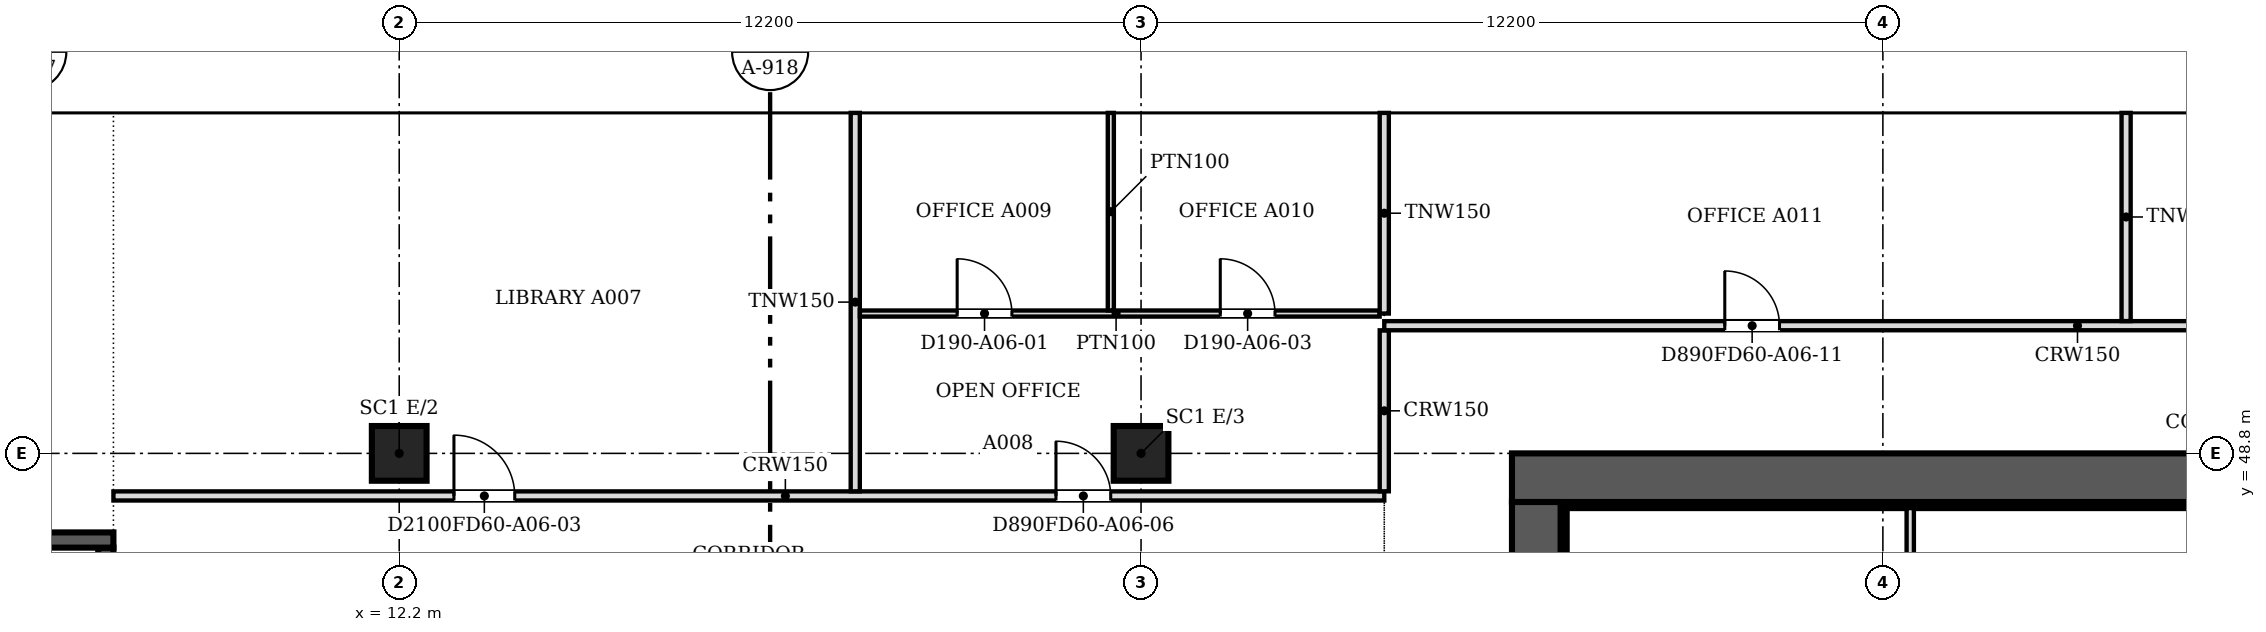
"""IFC4 building model, lengths in metres.
Left out: names, types, materials, properties, quantities, classifications, styles, units other than length and angle.
Written with IfcOpenShell. Run it as: python <this file> out.ifc"""

import sys

from ifc_helpers import new_model, si_unit, direction, frame, frame_2d, origin, origin_2d, place, context, subcontext, project, spatial, polyline, rectangle, outline, extrude, faceted_brep, source, transform, mapped, element, fill, save


model = new_model("IFC4")
c1 = context("Model", 3, precision=1e-05, world=origin(), true_north=direction((0.0, 1.0)))
c2 = subcontext(c1, "Body", "Model", "MODEL_VIEW")
j1 = project(units=[si_unit("LENGTHUNIT", "METRE"), si_unit("PLANEANGLEUNIT", "RADIAN")], contexts=[c1])
p1 = place(None, origin())
s1 = spatial("IfcSite", under=j1, at=p1, CompositionType="ELEMENT")
p2 = place(p1, origin())
s2 = spatial("IfcBuilding", under=s1, at=p2, CompositionType="ELEMENT")
p3 = place(p2, frame((0.0, 0.0, 68.6)))
s3 = spatial("IfcBuildingStorey", under=s2, at=p3, CompositionType="ELEMENT", Elevation=68.6)
for number, where, z_axis, x_axis in (
    (1, (12.2, 48.8, 0.0), (0.0, 0.0, 1.0), (1.0, 0.0, 0.0)),
    (2, (24.4, 48.8, 0.0), (0.0, 0.0, 1.0), (1.0, 0.0, 0.0)),
):
    element("IfcColumn", number, at=place(p3, frame(where, z_axis=z_axis, x_axis=x_axis)), inside=s3, PredefinedType="COLUMN", context=c2, shape_type="SweptSolid", body=[
        extrude(rectangle(XDim=0.9, YDim=0.9, at=origin_2d()), origin(), (0.0, 0.0, 1.0), 3.6),
    ])
m1 = source(origin(), c2, "Body", "SweptSolid", [
    extrude(outline(polyline([(6.1, 0.0), (3.05, 3.8), (0.0, 0.0), (6.1, 0.0)])), frame((0.0, 0.25, 0.0), z_axis=(0.0, -1.0, 0.0), x_axis=(1.0, 0.0, 0.0)), (0.0, 0.0, 1.0), 0.5),
])
p4 = place(p3, frame((45.75, 54.65, 0.0), z_axis=(0.0, 0.0, 1.0), x_axis=(-1.0, 0.0, 0.0)))
e3 = element("IfcWall", 3, at=p4, inside=s3, PredefinedType="SOLIDWALL", context=c2, shape_type="MappedRepresentation", body=[
    mapped(m1, transform((0.0, 0.0, 0.0), scale=1.0)),
])
m2 = source(origin(), c2, "Body", "SweptSolid", [
    extrude(outline(polyline([(5.579, 0.25), (3.05, 3.4), (0.521, 0.25), (5.579, 0.25)])), frame((0.0, 0.26, 0.0), z_axis=(0.0, -1.0, 0.0), x_axis=(1.0, 0.0, 0.0)), (0.0, 0.0, 1.0), 0.52),
])
p5 = place(p4, origin())
e4 = element("IfcOpeningElement", 4, at=p5, cuts=e3, PredefinedType="OPENING", context=c2, shape_type="MappedRepresentation", body=[
    mapped(m2, transform((0.0, 0.0, 0.0), scale=1.0)),
])
m3 = source(origin(), c2, "Body", "Brep", [
    faceted_brep([(6.1, -0.25, 0.0), (3.05, -0.25, 3.8), (0.0, -0.25, 0.0), (6.1, -0.25, 0.0), (0.0, 0.25, 0.0), (3.05, 0.25, 3.8), (6.1, 0.25, 0.0), (6.1, 0.25, 0.0)], [[[0, 1, 2, 3]], [[4, 5, 6, 7]], [[6, 5, 1, 0]], [[5, 4, 2, 1]], [[4, 7, 3, 2]], [[3, 7, 6, 0]]]),
])
p6 = place(p3, frame((39.65, 54.65, 0.0), z_axis=(0.0, 0.0, 1.0), x_axis=(-1.0, 0.0, 0.0)))
e5 = element("IfcWall", 5, at=p6, inside=s3, PredefinedType="SOLIDWALL", context=c2, shape_type="MappedRepresentation", body=[
    mapped(m3, transform((0.0, 0.0, 0.0), scale=1.0)),
])
p7 = place(p6, origin())
e6 = element("IfcOpeningElement", 6, at=p7, cuts=e5, PredefinedType="OPENING", context=c2, shape_type="MappedRepresentation", body=[
    mapped(m2, transform((0.0, 0.0, 0.0), scale=1.0)),
])
p8 = place(p3, frame((33.55, 54.65, 0.0), z_axis=(0.0, 0.0, 1.0), x_axis=(-1.0, 0.0, 0.0)))
e7 = element("IfcWall", 7, at=p8, inside=s3, PredefinedType="SOLIDWALL", context=c2, shape_type="MappedRepresentation", body=[
    mapped(m1, transform((0.0, 0.0, 0.0), scale=1.0)),
])
p9 = place(p8, origin())
e8 = element("IfcOpeningElement", 8, at=p9, cuts=e7, PredefinedType="OPENING", context=c2, shape_type="MappedRepresentation", body=[
    mapped(m2, transform((0.0, 0.0, 0.0), scale=1.0)),
])
p10 = place(p3, frame((27.45, 54.65, 0.0), z_axis=(0.0, 0.0, 1.0), x_axis=(-1.0, 0.0, 0.0)))
e9 = element("IfcWall", 9, at=p10, inside=s3, PredefinedType="SOLIDWALL", context=c2, shape_type="MappedRepresentation", body=[
    mapped(m3, transform((0.0, 0.0, 0.0), scale=1.0)),
])
p11 = place(p10, origin())
e10 = element("IfcOpeningElement", 10, at=p11, cuts=e9, PredefinedType="OPENING", context=c2, shape_type="MappedRepresentation", body=[
    mapped(m2, transform((0.0, 0.0, 0.0), scale=1.0)),
])
p12 = place(p3, frame((21.35, 54.65, 0.0), z_axis=(0.0, 0.0, 1.0), x_axis=(-1.0, 0.0, 0.0)))
e11 = element("IfcWall", 11, at=p12, inside=s3, PredefinedType="SOLIDWALL", context=c2, shape_type="MappedRepresentation", body=[
    mapped(m1, transform((0.0, 0.0, 0.0), scale=1.0)),
])
p13 = place(p12, origin())
e12 = element("IfcOpeningElement", 12, at=p13, cuts=e11, PredefinedType="OPENING", context=c2, shape_type="MappedRepresentation", body=[
    mapped(m2, transform((0.0, 0.0, 0.0), scale=1.0)),
])
p14 = place(p3, frame((15.25, 54.65, 0.0), z_axis=(0.0, 0.0, 1.0), x_axis=(-1.0, 0.0, 0.0)))
e13 = element("IfcWall", 13, at=p14, inside=s3, PredefinedType="SOLIDWALL", context=c2, shape_type="MappedRepresentation", body=[
    mapped(m1, transform((0.0, 0.0, 0.0), scale=1.0)),
])
p15 = place(p14, origin())
e14 = element("IfcOpeningElement", 14, at=p15, cuts=e13, PredefinedType="OPENING", context=c2, shape_type="MappedRepresentation", body=[
    mapped(m2, transform((0.0, 0.0, 0.0), scale=1.0)),
])
m4 = source(origin(), c2, "Body", "Brep", [
    faceted_brep([(3.05, -0.25, 3.74), (3.003, -0.25, 3.8), (0.0, -0.25, 0.0), (3.05, -0.25, 0.0), (0.0, 0.25, 0.0), (2.957, 0.25, 3.741), (2.957, 0.25, 0.0), (3.003, 0.0, 3.8)], [[[0, 1, 2, 3]], [[4, 5, 6]], [[7, 1, 0]], [[5, 4, 2, 1, 7]], [[4, 6, 3, 2]], [[3, 6, 5, 7, 0]]]),
])
p16 = place(p3, frame((9.15, 54.65, 0.0), z_axis=(0.0, 0.0, 1.0), x_axis=(-1.0, 0.0, 0.0)))
e15 = element("IfcWall", 15, at=p16, inside=s3, PredefinedType="SOLIDWALL", context=c2, shape_type="MappedRepresentation", body=[
    mapped(m4, transform((0.0, 0.0, 0.0), scale=1.0)),
])
m5 = source(origin(), c2, "Body", "SweptSolid", [
    extrude(outline(polyline([(2.803, 3.144), (0.516, 0.25), (2.803, 0.25), (2.803, 3.144)])), frame((0.0, 0.26, 0.0), z_axis=(0.0, -1.0, 0.0), x_axis=(1.0, 0.0, 0.0)), (0.0, 0.0, 1.0), 0.52),
])
p17 = place(p16, origin())
e16 = element("IfcOpeningElement", 16, at=p17, cuts=e15, PredefinedType="OPENING", context=c2, shape_type="MappedRepresentation", body=[
    mapped(m5, transform((0.0, 0.0, 0.0), scale=1.0)),
])
p18 = place(p2, frame((0.0, 0.0, 72.4)))
s4 = spatial("IfcBuildingStorey", under=s2, at=p18, CompositionType="ELEMENT", Elevation=72.4)
m6 = source(origin(), c2, "Body", "Brep", [
    faceted_brep([(3.05, -0.25, 0.0), (6.1, -0.25, 3.8), (6.1, -0.25, 3.8), (3.05, -0.25, 7.6), (0.0, -0.25, 3.8), (0.0, 0.25, 3.8), (3.05, 0.25, 7.6), (6.1, 0.25, 3.8), (6.1, 0.25, 3.8), (3.05, 0.25, 0.0)], [[[0, 1, 2, 3, 4]], [[5, 6, 7, 8, 9]], [[9, 8, 1, 0]], [[7, 6, 3, 2]], [[6, 5, 4, 3]], [[5, 9, 0, 4]], [[1, 8, 7, 2]]]),
])
p19 = place(p18, frame((42.7, 54.65, -3.8), z_axis=(0.0, 0.0, 1.0), x_axis=(-1.0, 0.0, 0.0)))
e17 = element("IfcWall", 17, at=p19, inside=s4, PredefinedType="SOLIDWALL", context=c2, shape_type="MappedRepresentation", body=[
    mapped(m6, transform((0.0, 0.0, 0.0), scale=1.0)),
])
m7 = source(origin(), c2, "Body", "SweptSolid", [
    extrude(outline(polyline([(3.05, 0.399), (5.78, 3.8), (3.05, 7.2), (0.321, 3.8), (3.05, 0.399)])), frame((0.0, 0.26, 0.0), z_axis=(0.0, -1.0, 0.0), x_axis=(1.0, 0.0, 0.0)), (0.0, 0.0, 1.0), 0.52),
])
p20 = place(p19, origin())
e18 = element("IfcOpeningElement", 18, at=p20, cuts=e17, PredefinedType="OPENING", context=c2, shape_type="MappedRepresentation", body=[
    mapped(m7, transform((0.0, 0.0, 0.0), scale=1.0)),
])
m8 = source(origin(), c2, "Body", "SweptSolid", [
    extrude(outline(polyline([(3.05, 0.0), (6.1, 3.8), (3.05, 7.6), (0.0, 3.8), (3.05, 0.0)])), frame((0.0, 0.25, 0.0), z_axis=(0.0, -1.0, 0.0), x_axis=(1.0, 0.0, 0.0)), (0.0, 0.0, 1.0), 0.5),
])
p21 = place(p18, frame((36.6, 54.65, -3.8), z_axis=(0.0, 0.0, 1.0), x_axis=(-1.0, 0.0, 0.0)))
e19 = element("IfcWall", 19, at=p21, inside=s4, PredefinedType="SOLIDWALL", context=c2, shape_type="MappedRepresentation", body=[
    mapped(m8, transform((0.0, 0.0, 0.0), scale=1.0)),
])
p22 = place(p21, origin())
e20 = element("IfcOpeningElement", 20, at=p22, cuts=e19, PredefinedType="OPENING", context=c2, shape_type="MappedRepresentation", body=[
    mapped(m7, transform((0.0, 0.0, 0.0), scale=1.0)),
])
p23 = place(p18, frame((30.5, 54.65, -3.8), z_axis=(0.0, 0.0, 1.0), x_axis=(-1.0, 0.0, 0.0)))
e21 = element("IfcWall", 21, at=p23, inside=s4, PredefinedType="SOLIDWALL", context=c2, shape_type="MappedRepresentation", body=[
    mapped(m8, transform((0.0, 0.0, 0.0), scale=1.0)),
])
p24 = place(p23, origin())
e22 = element("IfcOpeningElement", 22, at=p24, cuts=e21, PredefinedType="OPENING", context=c2, shape_type="MappedRepresentation", body=[
    mapped(m7, transform((0.0, 0.0, 0.0), scale=1.0)),
])
p25 = place(p18, frame((24.4, 54.65, -3.8), z_axis=(0.0, 0.0, 1.0), x_axis=(-1.0, 0.0, 0.0)))
e23 = element("IfcWall", 23, at=p25, inside=s4, PredefinedType="SOLIDWALL", context=c2, shape_type="MappedRepresentation", body=[
    mapped(m6, transform((0.0, 0.0, 0.0), scale=1.0)),
])
p26 = place(p25, origin())
e24 = element("IfcOpeningElement", 24, at=p26, cuts=e23, PredefinedType="OPENING", context=c2, shape_type="MappedRepresentation", body=[
    mapped(m7, transform((0.0, 0.0, 0.0), scale=1.0)),
])
p27 = place(p18, frame((18.3, 54.65, -3.8), z_axis=(0.0, 0.0, 1.0), x_axis=(-1.0, 0.0, 0.0)))
e25 = element("IfcWall", 25, at=p27, inside=s4, PredefinedType="SOLIDWALL", context=c2, shape_type="MappedRepresentation", body=[
    mapped(m8, transform((0.0, 0.0, 0.0), scale=1.0)),
])
p28 = place(p27, origin())
e26 = element("IfcOpeningElement", 26, at=p28, cuts=e25, PredefinedType="OPENING", context=c2, shape_type="MappedRepresentation", body=[
    mapped(m7, transform((0.0, 0.0, 0.0), scale=1.0)),
])
m9 = source(origin(), c2, "Body", "Brep", [
    faceted_brep([(3.05, -0.25, 0.0), (6.053, -0.25, 3.8), (3.05, -0.25, 7.6), (0.0, -0.25, 3.8), (0.0, 0.25, 3.8), (3.05, 0.25, 7.6), (6.007, 0.25, 3.859), (6.007, 0.25, 3.741), (3.05, 0.25, 0.0), (6.053, 0.0, 3.8)], [[[0, 1, 2, 3]], [[4, 5, 6, 7, 8]], [[8, 7, 9, 1, 0]], [[6, 5, 2, 1, 9]], [[5, 4, 3, 2]], [[4, 8, 0, 3]], [[9, 7, 6]]]),
])
p29 = place(p18, frame((12.2, 54.65, -3.8), z_axis=(0.0, 0.0, 1.0), x_axis=(-1.0, 0.0, 0.0)))
e27 = element("IfcWall", 27, at=p29, inside=s4, PredefinedType="SOLIDWALL", context=c2, shape_type="MappedRepresentation", body=[
    mapped(m9, transform((0.0, 0.0, 0.0), scale=1.0)),
])
m10 = source(origin(), c2, "Body", "SweptSolid", [
    extrude(outline(polyline([(3.049, 0.401), (5.735, 3.8), (3.049, 7.199), (0.321, 3.8), (3.049, 0.401)])), frame((0.0, 0.26, 0.0), z_axis=(0.0, -1.0, 0.0), x_axis=(1.0, 0.0, 0.0)), (0.0, 0.0, 1.0), 0.52),
])
p30 = place(p29, origin())
e28 = element("IfcOpeningElement", 28, at=p30, cuts=e27, PredefinedType="OPENING", context=c2, shape_type="MappedRepresentation", body=[
    mapped(m10, transform((0.0, 0.0, 0.0), scale=1.0)),
])
p31 = place(p3, frame((30.9, 25.2, 0.0), z_axis=(0.0, 0.0, 1.0), x_axis=(0.0, 1.0, 0.0)))
e29 = element("IfcWall", 29, at=p31, inside=s3, PredefinedType="SHEAR", context=c2, shape_type="SweptSolid", body=[
    extrude(rectangle(XDim=22.8, YDim=0.8, at=frame_2d((11.4, 0.0))), origin(), (0.0, 0.0, 1.0), 3.8),
])
m11 = source(origin(), c2, "Body", "SweptSolid", [
    extrude(rectangle(XDim=2.1, YDim=2.4, at=frame_2d((1.05, 1.2))), frame((0.0, 0.41, 0.0), z_axis=(0.0, -1.0, 0.0), x_axis=(1.0, 0.0, 0.0)), (0.0, 0.0, 1.0), 0.82),
])
p32 = place(p31, frame((4.6, 0.0, 0.0)))
e30 = element("IfcOpeningElement", 30, at=p32, cuts=e29, PredefinedType="OPENING", context=c2, shape_type="MappedRepresentation", body=[
    mapped(m11, transform((0.0, 0.0, 0.0), scale=1.0)),
])
p33 = place(p31, frame((16.1, 0.0, 0.0)))
e31 = element("IfcOpeningElement", 31, at=p33, cuts=e29, PredefinedType="OPENING", context=c2, shape_type="MappedRepresentation", body=[
    mapped(m11, transform((0.0, 0.0, 0.0), scale=1.0)),
])
p34 = place(p3, frame((30.5, 48.4, 0.0), z_axis=(0.0, 0.0, 1.0), x_axis=(1.0, 0.0, 0.0)))
e32 = element("IfcWall", 32, at=p34, inside=s3, PredefinedType="SHEAR", context=c2, shape_type="SweptSolid", body=[
    extrude(rectangle(XDim=24.4, YDim=0.8, at=frame_2d((12.2, 0.0))), origin(), (0.0, 0.0, 1.0), 3.8),
])
p35 = place(p3, frame((31.3, 47.95, 0.0), z_axis=(0.0, 0.0, 1.0), x_axis=(1.0, 0.0, 0.0)))
e33 = element("IfcWall", 33, at=p35, inside=s3, PredefinedType="SOLIDWALL", context=c2, shape_type="SweptSolid", body=[
    extrude(rectangle(XDim=22.8, YDim=0.1, at=frame_2d((11.4, 0.0))), origin(), (0.0, 0.0, 1.0), 3.8),
])
p36 = place(p3, frame((31.35, 43.4, 0.0), z_axis=(0.0, 0.0, 1.0), x_axis=(0.0, 1.0, 0.0)))
e34 = element("IfcWall", 34, at=p36, inside=s3, PredefinedType="SOLIDWALL", context=c2, shape_type="SweptSolid", body=[
    extrude(rectangle(XDim=4.5, YDim=0.1, at=frame_2d((2.25, 0.0))), origin(), (0.0, 0.0, 1.0), 3.8),
])
p37 = place(p3, frame((37.05, 44.96, 0.0), z_axis=(0.0, 0.0, 1.0), x_axis=(0.0, 1.0, 0.0)))
e35 = element("IfcWall", 35, at=p37, inside=s3, PredefinedType="PARTITIONING", context=c2, shape_type="SweptSolid", body=[
    extrude(rectangle(XDim=2.94, YDim=0.12, at=frame_2d((1.47, 0.0))), origin(), (0.0, 0.0, 1.0), 3.6),
])
p38 = place(p3, frame((3.6, 47.375, 0.0), z_axis=(0.0, 0.0, 1.0), x_axis=(1.0, 0.0, 0.0)))
e36 = element("IfcWall", 36, at=p38, inside=s3, PredefinedType="SOLIDWALL", context=c2, shape_type="SweptSolid", body=[
    extrude(rectangle(XDim=3.9, YDim=0.25, at=frame_2d((1.95, 0.0))), origin(), (0.0, 0.0, 1.0), 3.8),
])
p39 = place(p3, frame((7.375, 47.25, 0.0), z_axis=(0.0, 0.0, 1.0), x_axis=(0.0, -1.0, 0.0)))
e37 = element("IfcWall", 37, at=p39, inside=s3, PredefinedType="SOLIDWALL", context=c2, shape_type="SweptSolid", body=[
    extrude(rectangle(XDim=8.0, YDim=0.25, at=frame_2d((4.0, 0.0))), origin(), (0.0, 0.0, 1.0), 3.8),
])
m12 = source(origin(), c2, "Body", "SweptSolid", [
    extrude(rectangle(XDim=1.2, YDim=2.1, at=frame_2d((0.6, 1.05))), frame((0.0, 0.135, 0.0), z_axis=(0.0, -1.0, 0.0), x_axis=(1.0, 0.0, 0.0)), (0.0, 0.0, 1.0), 0.27),
])
p40 = place(p39, frame((0.15, 0.0, 0.0)))
e38 = element("IfcOpeningElement", 38, at=p40, cuts=e37, PredefinedType="OPENING", context=c2, shape_type="MappedRepresentation", body=[
    mapped(m12, transform((0.0, 0.0, 0.0), scale=1.0)),
])
p41 = place(p3, frame((7.5, 48.1, 0.0), z_axis=(0.0, 0.0, 1.0), x_axis=(1.0, 0.0, 0.0)))
e39 = element("IfcWall", 39, at=p41, inside=s3, PredefinedType="PARTITIONING", context=c2, shape_type="SweptSolid", body=[
    extrude(rectangle(XDim=20.9, YDim=0.15, at=frame_2d((10.45, 0.0))), origin(), (0.0, 0.0, 1.0), 3.067),
])
m13 = source(origin(), c2, "Body", "SweptSolid", [
    extrude(rectangle(XDim=0.9, YDim=2.1, at=frame_2d((0.45, 1.05))), frame((0.0, 0.085, 0.0), z_axis=(0.0, -1.0, 0.0), x_axis=(1.0, 0.0, 0.0)), (0.0, 0.0, 1.0), 0.17),
])
p42 = place(p41, frame((15.501, 0.0, 0.0)))
e40 = element("IfcOpeningElement", 40, at=p42, cuts=e39, PredefinedType="OPENING", context=c2, shape_type="MappedRepresentation", body=[
    mapped(m13, transform((0.0, 0.0, 0.0), scale=1.0)),
])
m14 = source(origin(), c2, "Body", "SweptSolid", [
    extrude(rectangle(XDim=1.0, YDim=2.1, at=frame_2d((0.5, 1.05))), frame((0.0, 0.085, 0.0), z_axis=(0.0, -1.0, 0.0), x_axis=(1.0, 0.0, 0.0)), (0.0, 0.0, 1.0), 0.17),
])
p43 = place(p41, frame((5.6, 0.0, 0.0)))
e41 = element("IfcOpeningElement", 41, at=p43, cuts=e39, PredefinedType="OPENING", context=c2, shape_type="MappedRepresentation", body=[
    mapped(m14, transform((0.0, 0.0, 0.0), scale=1.0)),
])
p44 = place(p3, frame((19.7, 48.176, 0.0), z_axis=(0.0, 0.0, 1.0), x_axis=(0.0, 1.0, 0.0)))
e42 = element("IfcWall", 42, at=p44, inside=s3, PredefinedType="PARTITIONING", context=c2, shape_type="SweptSolid", body=[
    extrude(rectangle(XDim=6.224, YDim=0.15, at=frame_2d((3.112, 0.0))), origin(), (0.0, 0.0, 1.0), 3.067),
])
p45 = place(p3, frame((28.4, 48.176, 0.0), z_axis=(0.0, 0.0, 1.0), x_axis=(0.0, 1.0, 0.0)))
e43 = element("IfcWall", 43, at=p45, inside=s3, PredefinedType="PARTITIONING", context=c2, shape_type="SweptSolid", body=[
    extrude(rectangle(XDim=2.648, YDim=0.15, at=frame_2d((1.324, 0.0))), origin(), (0.0, 0.0, 1.0), 3.067),
])
p46 = place(p3, frame((28.4, 50.9, 0.0), z_axis=(0.0, 0.0, 1.0), x_axis=(1.0, 0.0, 0.0)))
e44 = element("IfcWall", 44, at=p46, inside=s3, PredefinedType="PARTITIONING", context=c2, shape_type="SweptSolid", body=[
    extrude(rectangle(XDim=31.254, YDim=0.15, at=frame_2d((15.627, 0.0))), origin(), (0.0, 0.0, 1.0), 3.067),
])
p47 = place(p46, frame((16.301, 0.0, 0.0)))
e45 = element("IfcOpeningElement", 45, at=p47, cuts=e44, PredefinedType="OPENING", context=c2, shape_type="MappedRepresentation", body=[
    mapped(m13, transform((0.0, 0.0, 0.0), scale=1.0)),
])
p48 = place(p46, frame((25.85, 0.0, 0.0)))
e46 = element("IfcOpeningElement", 46, at=p48, cuts=e44, PredefinedType="OPENING", context=c2, shape_type="MappedRepresentation", body=[
    mapped(m13, transform((0.0, 0.0, 0.0), scale=1.0)),
])
p49 = place(p46, frame((5.6, 0.0, 0.0)))
e47 = element("IfcOpeningElement", 47, at=p49, cuts=e44, PredefinedType="OPENING", context=c2, shape_type="MappedRepresentation", body=[
    mapped(m13, transform((0.0, 0.0, 0.0), scale=1.0)),
])
p50 = place(p3, frame((40.6, 50.976, 0.0), z_axis=(0.0, 0.0, 1.0), x_axis=(0.0, 1.0, 0.0)))
e48 = element("IfcWall", 48, at=p50, inside=s3, PredefinedType="PARTITIONING", context=c2, shape_type="SweptSolid", body=[
    extrude(rectangle(XDim=3.424, YDim=0.15, at=frame_2d((1.712, 0.0))), origin(), (0.0, 0.0, 1.0), 3.067),
])
p51 = place(p3, frame((19.776, 51.1, 0.0), z_axis=(0.0, 0.0, 1.0), x_axis=(1.0, 0.0, 0.0)))
e49 = element("IfcWall", 49, at=p51, inside=s3, PredefinedType="PARTITIONING", context=c2, shape_type="SweptSolid", body=[
    extrude(rectangle(XDim=8.548, YDim=0.1, at=frame_2d((4.274, 0.0))), origin(), (0.0, 0.0, 1.0), 3.067),
])
m15 = source(origin(), c2, "Body", "SweptSolid", [
    extrude(rectangle(XDim=0.9, YDim=2.1, at=frame_2d((0.45, 1.05))), frame((0.0, 0.06, 0.0), z_axis=(0.0, -1.0, 0.0), x_axis=(1.0, 0.0, 0.0)), (0.0, 0.0, 1.0), 0.12),
])
p52 = place(p51, frame((1.6, 0.0, 0.0)))
e50 = element("IfcOpeningElement", 50, at=p52, cuts=e49, PredefinedType="OPENING", context=c2, shape_type="MappedRepresentation", body=[
    mapped(m15, transform((0.0, 0.0, 0.0), scale=1.0)),
])
p53 = place(p51, frame((5.927, 0.0, 0.0)))
e51 = element("IfcOpeningElement", 51, at=p53, cuts=e49, PredefinedType="OPENING", context=c2, shape_type="MappedRepresentation", body=[
    mapped(m15, transform((0.0, 0.0, 0.0), scale=1.0)),
])
p54 = place(p3, frame((28.4, 51.1, 0.0), z_axis=(0.0, 0.0, 1.0), x_axis=(0.0, 1.0, 0.0)))
e52 = element("IfcWall", 52, at=p54, inside=s3, PredefinedType="PARTITIONING", context=c2, shape_type="SweptSolid", body=[
    extrude(rectangle(XDim=3.3, YDim=0.15, at=frame_2d((1.65, 0.0))), origin(), (0.0, 0.0, 1.0), 3.067),
])
p55 = place(p3, frame((23.903, 51.151, 0.0), z_axis=(0.0, 0.0, 1.0), x_axis=(0.0, 1.0, 0.0)))
e53 = element("IfcWall", 53, at=p55, inside=s3, PredefinedType="PARTITIONING", context=c2, shape_type="SweptSolid", body=[
    extrude(rectangle(XDim=3.249, YDim=0.1, at=frame_2d((1.625, 0.0))), origin(), (0.0, 0.0, 1.0), 3.067),
])
m16 = source(origin(), c2, "Body", "SweptSolid", [
    extrude(rectangle(XDim=0.9, YDim=2.1, at=frame_2d((0.45, 1.05))), frame((0.0, 0.025, 0.0), z_axis=(0.0, -1.0, 0.0), x_axis=(1.0, 0.0, 0.0)), (0.0, 0.0, 1.0), 0.05),
])
p56 = place(p52, origin())
e54 = element("IfcDoor", 54, at=p56, inside=s3, OperationType="SINGLE_SWING_LEFT", PredefinedType="DOOR", context=c2, shape_type="MappedRepresentation", body=[
    mapped(m16, transform((0.0, 0.0, 0.0), scale=1.0)),
])
fill(e50, e54)
p57 = place(p53, origin())
e55 = element("IfcDoor", 55, at=p57, inside=s3, OperationType="SINGLE_SWING_LEFT", PredefinedType="DOOR", context=c2, shape_type="MappedRepresentation", body=[
    mapped(m16, transform((0.0, 0.0, 0.0), scale=1.0)),
])
fill(e51, e55)
p58 = place(p42, origin())
e56 = element("IfcDoor", 56, at=p58, inside=s3, OperationType="SINGLE_SWING_LEFT", PredefinedType="DOOR", context=c2, shape_type="MappedRepresentation", body=[
    mapped(m16, transform((0.0, 0.0, 0.0), scale=1.0)),
])
fill(e40, e56)
m17 = source(origin(), c2, "Body", "SweptSolid", [
    extrude(rectangle(XDim=1.0, YDim=2.1, at=frame_2d((0.5, 1.05))), frame((0.0, 0.025, 0.0), z_axis=(0.0, -1.0, 0.0), x_axis=(1.0, 0.0, 0.0)), (0.0, 0.0, 1.0), 0.05),
])
p59 = place(p43, origin())
e57 = element("IfcDoor", 57, at=p59, inside=s3, OperationType="SINGLE_SWING_LEFT", PredefinedType="DOOR", context=c2, shape_type="MappedRepresentation", body=[
    mapped(m17, transform((0.0, 0.0, 0.0), scale=1.0)),
])
fill(e41, e57)
p60 = place(p49, origin())
e58 = element("IfcDoor", 58, at=p60, inside=s3, OperationType="SINGLE_SWING_LEFT", PredefinedType="DOOR", context=c2, shape_type="MappedRepresentation", body=[
    mapped(m16, transform((0.0, 0.0, 0.0), scale=1.0)),
])
fill(e47, e58)
save(model, sys.argv[1])
